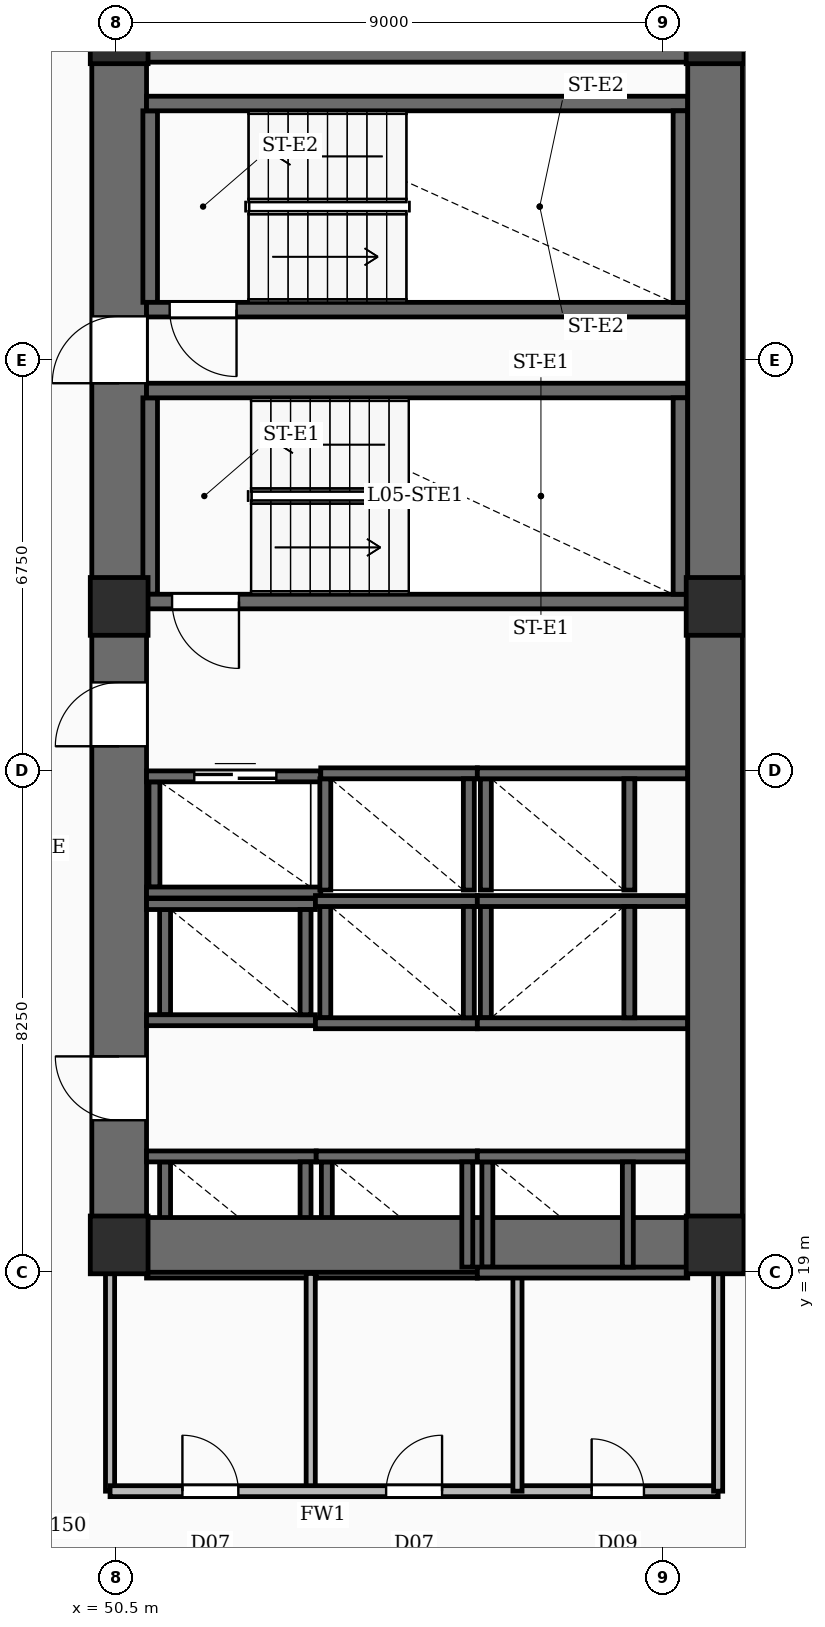
"""IFC4 building model, lengths in metres.
Left out: names, types, materials, properties, quantities, classifications, styles, units other than length and angle.
Written with IfcOpenShell. Run it as: python <this file> out.ifc"""

import sys

from ifc_helpers import new_model, si_unit, direction, frame, frame_2d, origin, origin_2d, place, context, subcontext, project, spatial, rectangle, extrude, element, fill, save


model = new_model("IFC4")
c1 = context("Model", 3, precision=1e-05, world=origin(), true_north=direction((0.0, 1.0)))
c2 = subcontext(c1, "Body", "Model", "MODEL_VIEW")
j1 = project(units=[si_unit("LENGTHUNIT", "METRE"), si_unit("PLANEANGLEUNIT", "RADIAN")], contexts=[c1])
p1 = place(None, origin())
s1 = spatial("IfcSite", under=j1, at=p1, CompositionType="ELEMENT")
p2 = place(p1, origin())
s2 = spatial("IfcBuilding", under=s1, at=p2, CompositionType="ELEMENT")
p3 = place(p2, frame((0.0, 0.0, 28.0)))
s3 = spatial("IfcBuildingStorey", under=s2, at=p3, CompositionType="ELEMENT", Elevation=28.0)
p4 = place(p3, frame((50.55, 19.0, -0.35), z_axis=(0.0, 0.0, 1.0), x_axis=(0.0, 1.0, 0.0)))
e1 = element("IfcWall", 1, at=p4, inside=s3, PredefinedType="SHEAR", context=c2, shape_type="SweptSolid", body=[
    extrude(rectangle(XDim=20.8, YDim=0.9, at=frame_2d((10.4, 0.0))), origin(), (0.0, 0.0, 1.0), 5.9),
])
p5 = place(p4, frame((2.5, 0.0, 0.35)))
e2 = element("IfcOpeningElement", 2, at=p5, cuts=e1, PredefinedType="OPENING", context=c2, shape_type="SweptSolid", body=[
    extrude(rectangle(XDim=1.05, YDim=2.15, at=frame_2d((0.525, 1.075))), frame((0.0, 0.46, 0.0), z_axis=(0.0, -1.0, 0.0), x_axis=(1.0, 0.0, 0.0)), (0.0, 0.0, 1.0), 0.92),
])
p6 = place(p4, frame((8.65, 0.0, 0.35)))
e3 = element("IfcOpeningElement", 3, at=p6, cuts=e1, PredefinedType="OPENING", context=c2, shape_type="SweptSolid", body=[
    extrude(rectangle(XDim=1.05, YDim=2.15, at=frame_2d((0.525, 1.075))), frame((0.0, 0.46, 0.0), z_axis=(0.0, -1.0, 0.0), x_axis=(1.0, 0.0, 0.0)), (0.0, 0.0, 1.0), 0.92),
])
p7 = place(p4, frame((14.62, 0.0, 0.35)))
e4 = element("IfcOpeningElement", 4, at=p7, cuts=e1, PredefinedType="OPENING", context=c2, shape_type="SweptSolid", body=[
    extrude(rectangle(XDim=1.1, YDim=2.15, at=frame_2d((0.55, 1.075))), frame((0.0, 0.46, 0.0), z_axis=(0.0, -1.0, 0.0), x_axis=(1.0, 0.0, 0.0)), (0.0, 0.0, 1.0), 0.92),
])
p8 = place(p3, frame((60.35, 19.0, -0.35), z_axis=(0.0, 0.0, 1.0), x_axis=(0.0, 1.0, 0.0)))
e5 = element("IfcWall", 5, at=p8, inside=s3, PredefinedType="SHEAR", context=c2, shape_type="SweptSolid", body=[
    extrude(rectangle(XDim=20.8, YDim=0.9, at=frame_2d((10.4, 0.0))), origin(), (0.0, 0.0, 1.0), 5.9),
])
for number, where, z_axis, x_axis in (
    (6, (51.0, 19.45, -0.35), (0.0, 0.0, 1.0), (1.0, 0.0, 0.0)),
    (7, (51.0, 39.35, -0.35), (0.0, 0.0, 1.0), (1.0, 0.0, 0.0)),
):
    element("IfcWall", number, at=place(p3, frame(where, z_axis=z_axis, x_axis=x_axis)), inside=s3, PredefinedType="SHEAR", context=c2, shape_type="SweptSolid", body=[
        extrude(rectangle(XDim=8.9, YDim=0.9, at=frame_2d((4.45, 0.0))), origin(), (0.0, 0.0, 1.0), 5.9),
    ])
for number, where, z_axis, x_axis in (
    (8, (50.55, 19.45, -0.35), (0.0, 0.0, 1.0), (1.0, 0.0, 0.0)),
    (9, (60.35, 19.45, -0.35), (0.0, 0.0, 1.0), (1.0, 0.0, 0.0)),
    (10, (50.55, 29.95, -0.35), (0.0, 0.0, 1.0), (1.0, 0.0, 0.0)),
    (11, (60.35, 29.95, -0.35), (0.0, 0.0, 1.0), (1.0, 0.0, 0.0)),
    (12, (50.55, 39.35, -0.35), (0.0, 0.0, 1.0), (1.0, 0.0, 0.0)),
    (13, (60.35, 39.35, -0.35), (0.0, 0.0, 1.0), (1.0, 0.0, 0.0)),
):
    element("IfcColumn", number, at=place(p3, frame(where, z_axis=z_axis, x_axis=x_axis)), inside=s3, PredefinedType="COLUMN", context=c2, shape_type="SweptSolid", body=[
        extrude(rectangle(XDim=0.95, YDim=0.95, at=origin_2d()), origin(), (0.0, 0.0, 1.0), 5.9),
    ])
p9 = place(p3, frame((59.9, 30.03, 0.0), z_axis=(0.0, 0.0, 1.0), x_axis=(-1.0, 0.0, 0.0)))
e14 = element("IfcWall", 14, at=p9, inside=s3, PredefinedType="SOLIDWALL", context=c2, shape_type="SweptSolid", body=[
    extrude(rectangle(XDim=8.9, YDim=0.24, at=frame_2d((4.45, 0.0))), origin(), (0.0, 0.0, 1.0), 5.55),
])
p10 = place(p9, frame((7.38, 0.0, 0.0)))
e15 = element("IfcOpeningElement", 15, at=p10, cuts=e14, PredefinedType="OPENING", context=c2, shape_type="SweptSolid", body=[
    extrude(rectangle(XDim=1.1, YDim=2.15, at=frame_2d((0.55, 1.075))), frame((0.0, 0.13, 0.0), z_axis=(0.0, -1.0, 0.0), x_axis=(1.0, 0.0, 0.0)), (0.0, 0.0, 1.0), 0.26),
])
p11 = place(p3, frame((51.0, 33.5, 0.0), z_axis=(0.0, 0.0, 1.0), x_axis=(1.0, 0.0, 0.0)))
e16 = element("IfcWall", 16, at=p11, inside=s3, PredefinedType="SOLIDWALL", context=c2, shape_type="SweptSolid", body=[
    extrude(rectangle(XDim=8.9, YDim=0.24, at=frame_2d((4.45, 0.0))), origin(), (0.0, 0.0, 1.0), 5.55),
])
for number, where, z_axis, x_axis in (
    (17, (51.06, 30.15, 0.0), (0.0, 0.0, 1.0), (0.0, 1.0, 0.0)),
    (18, (59.78, 30.15, 0.0), (0.0, 0.0, 1.0), (0.0, 1.0, 0.0)),
):
    element("IfcWall", number, at=place(p3, frame(where, z_axis=z_axis, x_axis=x_axis)), inside=s3, PredefinedType="SOLIDWALL", context=c2, shape_type="SweptSolid", body=[
        extrude(rectangle(XDim=3.23, YDim=0.24, at=frame_2d((1.615, 0.0))), origin(), (0.0, 0.0, 1.0), 5.55),
    ])
p12 = place(p3, frame((59.9, 34.83, 0.0), z_axis=(0.0, 0.0, 1.0), x_axis=(-1.0, 0.0, 0.0)))
e19 = element("IfcWall", 19, at=p12, inside=s3, PredefinedType="SOLIDWALL", context=c2, shape_type="SweptSolid", body=[
    extrude(rectangle(XDim=8.9, YDim=0.24, at=frame_2d((4.45, 0.0))), origin(), (0.0, 0.0, 1.0), 5.55),
])
p13 = place(p12, frame((7.42, 0.0, 0.0)))
e20 = element("IfcOpeningElement", 20, at=p13, cuts=e19, PredefinedType="OPENING", context=c2, shape_type="SweptSolid", body=[
    extrude(rectangle(XDim=1.1, YDim=2.15, at=frame_2d((0.55, 1.075))), frame((0.0, 0.13, 0.0), z_axis=(0.0, -1.0, 0.0), x_axis=(1.0, 0.0, 0.0)), (0.0, 0.0, 1.0), 0.26),
])
p14 = place(p3, frame((51.0, 38.22, 0.0), z_axis=(0.0, 0.0, 1.0), x_axis=(1.0, 0.0, 0.0)))
e21 = element("IfcWall", 21, at=p14, inside=s3, PredefinedType="SOLIDWALL", context=c2, shape_type="SweptSolid", body=[
    extrude(rectangle(XDim=8.9, YDim=0.24, at=frame_2d((4.45, 0.0))), origin(), (0.0, 0.0, 1.0), 5.55),
])
for number, where, z_axis, x_axis in (
    (22, (51.06, 34.95, 0.0), (0.0, 0.0, 1.0), (0.0, 1.0, 0.0)),
    (23, (59.78, 34.95, 0.0), (0.0, 0.0, 1.0), (0.0, 1.0, 0.0)),
):
    element("IfcWall", number, at=place(p3, frame(where, z_axis=z_axis, x_axis=x_axis)), inside=s3, PredefinedType="SOLIDWALL", context=c2, shape_type="SweptSolid", body=[
        extrude(rectangle(XDim=3.15, YDim=0.24, at=frame_2d((1.575, 0.0))), origin(), (0.0, 0.0, 1.0), 5.55),
    ])
for number, where, z_axis, x_axis in (
    (24, (51.0, 20.905, 0.0), (0.0, 0.0, 1.0), (1.0, 0.0, 0.0)),
    (25, (51.0, 18.995, 0.0), (0.0, 0.0, 1.0), (1.0, 0.0, 0.0)),
):
    element("IfcWall", number, at=place(p3, frame(where, z_axis=z_axis, x_axis=x_axis)), inside=s3, PredefinedType="SOLIDWALL", context=c2, shape_type="SweptSolid", body=[
        extrude(rectangle(XDim=2.79, YDim=0.18, at=frame_2d((1.395, 0.0))), origin(), (0.0, 0.0, 1.0), 5.55),
    ])
for number, where, z_axis, x_axis in (
    (26, (51.305, 19.085, 0.0), (0.0, 0.0, 1.0), (0.0, 1.0, 0.0)),
    (27, (53.615, 19.085, 0.0), (0.0, 0.0, 1.0), (0.0, 1.0, 0.0)),
):
    element("IfcWall", number, at=place(p3, frame(where, z_axis=z_axis, x_axis=x_axis)), inside=s3, PredefinedType="SOLIDWALL", context=c2, shape_type="SweptSolid", body=[
        extrude(rectangle(XDim=1.73, YDim=0.18, at=frame_2d((0.865, 0.0))), origin(), (0.0, 0.0, 1.0), 5.55),
    ])
for number, where, z_axis, x_axis in (
    (28, (53.79, 20.905, 0.0), (0.0, 0.0, 1.0), (1.0, 0.0, 0.0)),
    (29, (53.79, 18.995, 0.0), (0.0, 0.0, 1.0), (1.0, 0.0, 0.0)),
):
    element("IfcWall", number, at=place(p3, frame(where, z_axis=z_axis, x_axis=x_axis)), inside=s3, PredefinedType="SOLIDWALL", context=c2, shape_type="SweptSolid", body=[
        extrude(rectangle(XDim=2.65, YDim=0.18, at=frame_2d((1.325, 0.0))), origin(), (0.0, 0.0, 1.0), 5.55),
    ])
for number, where, z_axis, x_axis in (
    (30, (53.965, 19.085, 0.0), (0.0, 0.0, 1.0), (0.0, 1.0, 0.0)),
    (31, (56.275, 19.085, 0.0), (0.0, 0.0, 1.0), (0.0, 1.0, 0.0)),
):
    element("IfcWall", number, at=place(p3, frame(where, z_axis=z_axis, x_axis=x_axis)), inside=s3, PredefinedType="SOLIDWALL", context=c2, shape_type="SweptSolid", body=[
        extrude(rectangle(XDim=1.73, YDim=0.18, at=frame_2d((0.865, 0.0))), origin(), (0.0, 0.0, 1.0), 5.55),
    ])
for number, where, z_axis, x_axis in (
    (32, (56.44, 20.905, 0.0), (0.0, 0.0, 1.0), (1.0, 0.0, 0.0)),
    (33, (56.44, 18.995, 0.0), (0.0, 0.0, 1.0), (1.0, 0.0, 0.0)),
):
    element("IfcWall", number, at=place(p3, frame(where, z_axis=z_axis, x_axis=x_axis)), inside=s3, PredefinedType="SOLIDWALL", context=c2, shape_type="SweptSolid", body=[
        extrude(rectangle(XDim=3.46, YDim=0.18, at=frame_2d((1.73, 0.0))), origin(), (0.0, 0.0, 1.0), 5.55),
    ])
for number, where, z_axis, x_axis in (
    (34, (56.605, 19.085, 0.0), (0.0, 0.0, 1.0), (0.0, 1.0, 0.0)),
    (35, (58.915, 19.085, 0.0), (0.0, 0.0, 1.0), (0.0, 1.0, 0.0)),
):
    element("IfcWall", number, at=place(p3, frame(where, z_axis=z_axis, x_axis=x_axis)), inside=s3, PredefinedType="SOLIDWALL", context=c2, shape_type="SweptSolid", body=[
        extrude(rectangle(XDim=1.73, YDim=0.18, at=frame_2d((0.865, 0.0))), origin(), (0.0, 0.0, 1.0), 5.55),
    ])
for number, where, z_axis, x_axis in (
    (36, (51.0, 25.055, 0.0), (0.0, 0.0, 1.0), (1.0, 0.0, 0.0)),
    (37, (51.0, 23.145, 0.0), (0.0, 0.0, 1.0), (1.0, 0.0, 0.0)),
):
    element("IfcWall", number, at=place(p3, frame(where, z_axis=z_axis, x_axis=x_axis)), inside=s3, PredefinedType="SOLIDWALL", context=c2, shape_type="SweptSolid", body=[
        extrude(rectangle(XDim=2.778, YDim=0.18, at=frame_2d((1.389, 0.0))), origin(), (0.0, 0.0, 1.0), 5.55),
    ])
for number, where, z_axis, x_axis in (
    (38, (51.305, 23.235, 0.0), (0.0, 0.0, 1.0), (0.0, 1.0, 0.0)),
    (39, (53.615, 23.235, 0.0), (0.0, 0.0, 1.0), (0.0, 1.0, 0.0)),
):
    element("IfcWall", number, at=place(p3, frame(where, z_axis=z_axis, x_axis=x_axis)), inside=s3, PredefinedType="SOLIDWALL", context=c2, shape_type="SweptSolid", body=[
        extrude(rectangle(XDim=1.73, YDim=0.18, at=frame_2d((0.865, 0.0))), origin(), (0.0, 0.0, 1.0), 5.55),
    ])
for number, where, z_axis, x_axis in (
    (40, (53.778, 25.105, 0.0), (0.0, 0.0, 1.0), (1.0, 0.0, 0.0)),
    (41, (53.778, 23.095, 0.0), (0.0, 0.0, 1.0), (1.0, 0.0, 0.0)),
):
    element("IfcWall", number, at=place(p3, frame(where, z_axis=z_axis, x_axis=x_axis)), inside=s3, PredefinedType="SOLIDWALL", context=c2, shape_type="SweptSolid", body=[
        extrude(rectangle(XDim=2.662, YDim=0.18, at=frame_2d((1.331, 0.0))), origin(), (0.0, 0.0, 1.0), 5.55),
    ])
for number, where, z_axis, x_axis in (
    (42, (53.94, 23.185, 0.0), (0.0, 0.0, 1.0), (0.0, 1.0, 0.0)),
    (43, (56.3, 23.185, 0.0), (0.0, 0.0, 1.0), (0.0, 1.0, 0.0)),
):
    element("IfcWall", number, at=place(p3, frame(where, z_axis=z_axis, x_axis=x_axis)), inside=s3, PredefinedType="SOLIDWALL", context=c2, shape_type="SweptSolid", body=[
        extrude(rectangle(XDim=1.83, YDim=0.18, at=frame_2d((0.915, 0.0))), origin(), (0.0, 0.0, 1.0), 5.55),
    ])
for number, where, z_axis, x_axis in (
    (44, (56.44, 25.105, 0.0), (0.0, 0.0, 1.0), (1.0, 0.0, 0.0)),
    (45, (56.44, 23.095, 0.0), (0.0, 0.0, 1.0), (1.0, 0.0, 0.0)),
):
    element("IfcWall", number, at=place(p3, frame(where, z_axis=z_axis, x_axis=x_axis)), inside=s3, PredefinedType="SOLIDWALL", context=c2, shape_type="SweptSolid", body=[
        extrude(rectangle(XDim=3.46, YDim=0.18, at=frame_2d((1.73, 0.0))), origin(), (0.0, 0.0, 1.0), 5.55),
    ])
for number, where, z_axis, x_axis in (
    (46, (56.58, 23.185, 0.0), (0.0, 0.0, 1.0), (0.0, 1.0, 0.0)),
    (47, (58.94, 23.185, 0.0), (0.0, 0.0, 1.0), (0.0, 1.0, 0.0)),
):
    element("IfcWall", number, at=place(p3, frame(where, z_axis=z_axis, x_axis=x_axis)), inside=s3, PredefinedType="SOLIDWALL", context=c2, shape_type="SweptSolid", body=[
        extrude(rectangle(XDim=1.83, YDim=0.18, at=frame_2d((0.915, 0.0))), origin(), (0.0, 0.0, 1.0), 5.55),
    ])
p15 = place(p3, frame((53.865, 27.205, 0.0), z_axis=(0.0, 0.0, 1.0), x_axis=(1.0, 0.0, 0.0)))
e48 = element("IfcWall", 48, at=p15, inside=s3, PredefinedType="SOLIDWALL", context=c2, shape_type="SweptSolid", body=[
    extrude(rectangle(XDim=2.575, YDim=0.18, at=frame_2d((1.288, 0.0))), origin(), (0.0, 0.0, 1.0), 5.55),
])
for number, where, z_axis, x_axis in (
    (49, (53.94, 25.285, 0.0), (0.0, 0.0, 1.0), (0.0, 1.0, 0.0)),
    (50, (56.3, 25.285, 0.0), (0.0, 0.0, 1.0), (0.0, 1.0, 0.0)),
):
    element("IfcWall", number, at=place(p3, frame(where, z_axis=z_axis, x_axis=x_axis)), inside=s3, PredefinedType="SOLIDWALL", context=c2, shape_type="SweptSolid", body=[
        extrude(rectangle(XDim=1.83, YDim=0.18, at=frame_2d((0.915, 0.0))), origin(), (0.0, 0.0, 1.0), 5.55),
    ])
p16 = place(p3, frame((56.44, 27.205, 0.0), z_axis=(0.0, 0.0, 1.0), x_axis=(1.0, 0.0, 0.0)))
e51 = element("IfcWall", 51, at=p16, inside=s3, PredefinedType="SOLIDWALL", context=c2, shape_type="SweptSolid", body=[
    extrude(rectangle(XDim=3.46, YDim=0.18, at=frame_2d((1.73, 0.0))), origin(), (0.0, 0.0, 1.0), 5.55),
])
for number, where, z_axis, x_axis in (
    (52, (56.58, 25.285, 0.0), (0.0, 0.0, 1.0), (0.0, 1.0, 0.0)),
    (53, (58.94, 25.285, 0.0), (0.0, 0.0, 1.0), (0.0, 1.0, 0.0)),
):
    element("IfcWall", number, at=place(p3, frame(where, z_axis=z_axis, x_axis=x_axis)), inside=s3, PredefinedType="SOLIDWALL", context=c2, shape_type="SweptSolid", body=[
        extrude(rectangle(XDim=1.83, YDim=0.18, at=frame_2d((0.915, 0.0))), origin(), (0.0, 0.0, 1.0), 5.55),
    ])
p17 = place(p3, frame((51.0, 27.155, 0.0), z_axis=(0.0, 0.0, 1.0), x_axis=(1.0, 0.0, 0.0)))
e54 = element("IfcWall", 54, at=p17, inside=s3, PredefinedType="SOLIDWALL", context=c2, shape_type="SweptSolid", body=[
    extrude(rectangle(XDim=2.865, YDim=0.18, at=frame_2d((1.433, 0.0))), origin(), (0.0, 0.0, 1.0), 5.55),
])
p18 = place(p17, frame((0.785, 0.0, 0.0)))
e55 = element("IfcOpeningElement", 55, at=p18, cuts=e54, PredefinedType="OPENING", context=c2, shape_type="SweptSolid", body=[
    extrude(rectangle(XDim=1.35, YDim=2.3, at=frame_2d((0.675, 1.15))), frame((0.0, 0.1, 0.0), z_axis=(0.0, -1.0, 0.0), x_axis=(1.0, 0.0, 0.0)), (0.0, 0.0, 1.0), 0.2),
])
p19 = place(p3, frame((51.0, 25.245, 0.0), z_axis=(0.0, 0.0, 1.0), x_axis=(1.0, 0.0, 0.0)))
e56 = element("IfcWall", 56, at=p19, inside=s3, PredefinedType="SOLIDWALL", context=c2, shape_type="SweptSolid", body=[
    extrude(rectangle(XDim=2.865, YDim=0.18, at=frame_2d((1.433, 0.0))), origin(), (0.0, 0.0, 1.0), 5.55),
])
p20 = place(p3, frame((51.13, 25.335, 0.0), z_axis=(0.0, 0.0, 1.0), x_axis=(0.0, 1.0, 0.0)))
e57 = element("IfcWall", 57, at=p20, inside=s3, PredefinedType="SOLIDWALL", context=c2, shape_type="SweptSolid", body=[
    extrude(rectangle(XDim=1.73, YDim=0.18, at=frame_2d((0.865, 0.0))), origin(), (0.0, 0.0, 1.0), 5.55),
])
for number, where, z_axis, x_axis in (
    (58, (53.7, 15.4, 0.0), (0.0, 0.0, 1.0), (0.0, 1.0, 0.0)),
    (59, (57.1, 15.4, 0.0), (0.0, 0.0, 1.0), (0.0, 1.0, 0.0)),
):
    element("IfcWall", number, at=place(p3, frame(where, z_axis=z_axis, x_axis=x_axis)), inside=s3, PredefinedType="PARTITIONING", context=c2, shape_type="SweptSolid", body=[
        extrude(rectangle(XDim=3.58, YDim=0.15, at=frame_2d((1.79, 0.0))), origin(), (0.0, 0.0, 1.0), 4.61),
    ])
p21 = place(p3, frame((50.4, 15.4, 0.0), z_axis=(0.0, 0.0, 1.0), x_axis=(1.0, 0.0, 0.0)))
e60 = element("IfcWall", 60, at=p21, inside=s3, PredefinedType="SOLIDWALL", context=c2, shape_type="SweptSolid", body=[
    extrude(rectangle(XDim=10.0, YDim=0.18, at=frame_2d((5.0, 0.0))), origin(), (0.0, 0.0, 1.0), 4.61),
])
p22 = place(p21, frame((1.19, 0.0, 0.0)))
e61 = element("IfcOpeningElement", 61, at=p22, cuts=e60, PredefinedType="OPENING", context=c2, shape_type="SweptSolid", body=[
    extrude(rectangle(XDim=0.92, YDim=2.1, at=frame_2d((0.46, 1.05))), frame((0.0, 0.1, 0.0), z_axis=(0.0, -1.0, 0.0), x_axis=(1.0, 0.0, 0.0)), (0.0, 0.0, 1.0), 0.2),
])
p23 = place(p21, frame((4.54, 0.0, 0.0)))
e62 = element("IfcOpeningElement", 62, at=p23, cuts=e60, PredefinedType="OPENING", context=c2, shape_type="SweptSolid", body=[
    extrude(rectangle(XDim=0.92, YDim=2.1, at=frame_2d((0.46, 1.05))), frame((0.0, 0.1, 0.0), z_axis=(0.0, -1.0, 0.0), x_axis=(1.0, 0.0, 0.0)), (0.0, 0.0, 1.0), 0.2),
])
p24 = place(p21, frame((7.92, 0.0, 0.0)))
e63 = element("IfcOpeningElement", 63, at=p24, cuts=e60, PredefinedType="OPENING", context=c2, shape_type="SweptSolid", body=[
    extrude(rectangle(XDim=0.86, YDim=2.05, at=frame_2d((0.43, 1.025))), frame((0.0, 0.1, 0.0), z_axis=(0.0, -1.0, 0.0), x_axis=(1.0, 0.0, 0.0)), (0.0, 0.0, 1.0), 0.2),
])
for number, where, z_axis, x_axis in (
    (64, (50.4, 15.4, 0.0), (0.0, 0.0, 1.0), (0.0, 1.0, 0.0)),
    (65, (60.4, 15.4, 0.0), (0.0, 0.0, 1.0), (0.0, 1.0, 0.0)),
):
    element("IfcWall", number, at=place(p3, frame(where, z_axis=z_axis, x_axis=x_axis)), inside=s3, PredefinedType="PARTITIONING", context=c2, shape_type="SweptSolid", body=[
        extrude(rectangle(XDim=3.58, YDim=0.15, at=frame_2d((1.79, 0.0))), origin(), (0.0, 0.0, 1.0), 4.61),
    ])
p25 = place(p5, origin())
e66 = element("IfcDoor", 66, at=p25, inside=s3, OperationType="SINGLE_SWING_RIGHT", PredefinedType="DOOR", context=c2, shape_type="SweptSolid", body=[
    extrude(rectangle(XDim=1.05, YDim=2.15, at=frame_2d((0.525, 1.075))), frame((0.0, 0.025, 0.0), z_axis=(0.0, -1.0, 0.0), x_axis=(1.0, 0.0, 0.0)), (0.0, 0.0, 1.0), 0.05),
])
fill(e2, e66)
p26 = place(p6, origin())
e67 = element("IfcDoor", 67, at=p26, inside=s3, OperationType="SINGLE_SWING_LEFT", PredefinedType="DOOR", context=c2, shape_type="SweptSolid", body=[
    extrude(rectangle(XDim=1.05, YDim=2.15, at=frame_2d((0.525, 1.075))), frame((0.0, 0.025, 0.0), z_axis=(0.0, -1.0, 0.0), x_axis=(1.0, 0.0, 0.0)), (0.0, 0.0, 1.0), 0.05),
])
fill(e3, e67)
p27 = place(p7, origin())
e68 = element("IfcDoor", 68, at=p27, inside=s3, OperationType="SINGLE_SWING_LEFT", PredefinedType="DOOR", context=c2, shape_type="SweptSolid", body=[
    extrude(rectangle(XDim=1.1, YDim=2.15, at=frame_2d((0.55, 1.075))), frame((0.0, 0.025, 0.0), z_axis=(0.0, -1.0, 0.0), x_axis=(1.0, 0.0, 0.0)), (0.0, 0.0, 1.0), 0.05),
])
fill(e4, e68)
p28 = place(p10, origin())
e69 = element("IfcDoor", 69, at=p28, inside=s3, OperationType="SINGLE_SWING_LEFT", PredefinedType="DOOR", context=c2, shape_type="SweptSolid", body=[
    extrude(rectangle(XDim=1.1, YDim=2.15, at=frame_2d((0.55, 1.075))), frame((0.0, 0.025, 0.0), z_axis=(0.0, -1.0, 0.0), x_axis=(1.0, 0.0, 0.0)), (0.0, 0.0, 1.0), 0.05),
])
fill(e15, e69)
p29 = place(p13, origin())
e70 = element("IfcDoor", 70, at=p29, inside=s3, OperationType="SINGLE_SWING_LEFT", PredefinedType="DOOR", context=c2, shape_type="SweptSolid", body=[
    extrude(rectangle(XDim=1.1, YDim=2.15, at=frame_2d((0.55, 1.075))), frame((0.0, 0.025, 0.0), z_axis=(0.0, -1.0, 0.0), x_axis=(1.0, 0.0, 0.0)), (0.0, 0.0, 1.0), 0.05),
])
fill(e20, e70)
p30 = place(p18, origin())
e71 = element("IfcDoor", 71, at=p30, inside=s3, OperationType="DOUBLE_DOOR_SLIDING", PredefinedType="DOOR", context=c2, shape_type="SweptSolid", body=[
    extrude(rectangle(XDim=1.35, YDim=2.3, at=frame_2d((0.675, 1.15))), frame((0.0, 0.025, 0.0), z_axis=(0.0, -1.0, 0.0), x_axis=(1.0, 0.0, 0.0)), (0.0, 0.0, 1.0), 0.05),
])
fill(e55, e71)
p31 = place(p22, origin())
e72 = element("IfcDoor", 72, at=p31, inside=s3, OperationType="SINGLE_SWING_LEFT", PredefinedType="DOOR", context=c2, shape_type="SweptSolid", body=[
    extrude(rectangle(XDim=0.92, YDim=2.1, at=frame_2d((0.46, 1.05))), frame((0.0, 0.025, 0.0), z_axis=(0.0, -1.0, 0.0), x_axis=(1.0, 0.0, 0.0)), (0.0, 0.0, 1.0), 0.05),
])
fill(e61, e72)
p32 = place(p23, origin())
e73 = element("IfcDoor", 73, at=p32, inside=s3, OperationType="SINGLE_SWING_RIGHT", PredefinedType="DOOR", context=c2, shape_type="SweptSolid", body=[
    extrude(rectangle(XDim=0.92, YDim=2.1, at=frame_2d((0.46, 1.05))), frame((0.0, 0.025, 0.0), z_axis=(0.0, -1.0, 0.0), x_axis=(1.0, 0.0, 0.0)), (0.0, 0.0, 1.0), 0.05),
])
fill(e62, e73)
p33 = place(p24, origin())
e74 = element("IfcDoor", 74, at=p33, inside=s3, OperationType="SINGLE_SWING_LEFT", PredefinedType="DOOR", context=c2, shape_type="SweptSolid", body=[
    extrude(rectangle(XDim=0.86, YDim=2.05, at=frame_2d((0.43, 1.025))), frame((0.0, 0.025, 0.0), z_axis=(0.0, -1.0, 0.0), x_axis=(1.0, 0.0, 0.0)), (0.0, 0.0, 1.0), 0.05),
])
fill(e63, e74)
save(model, sys.argv[1])
